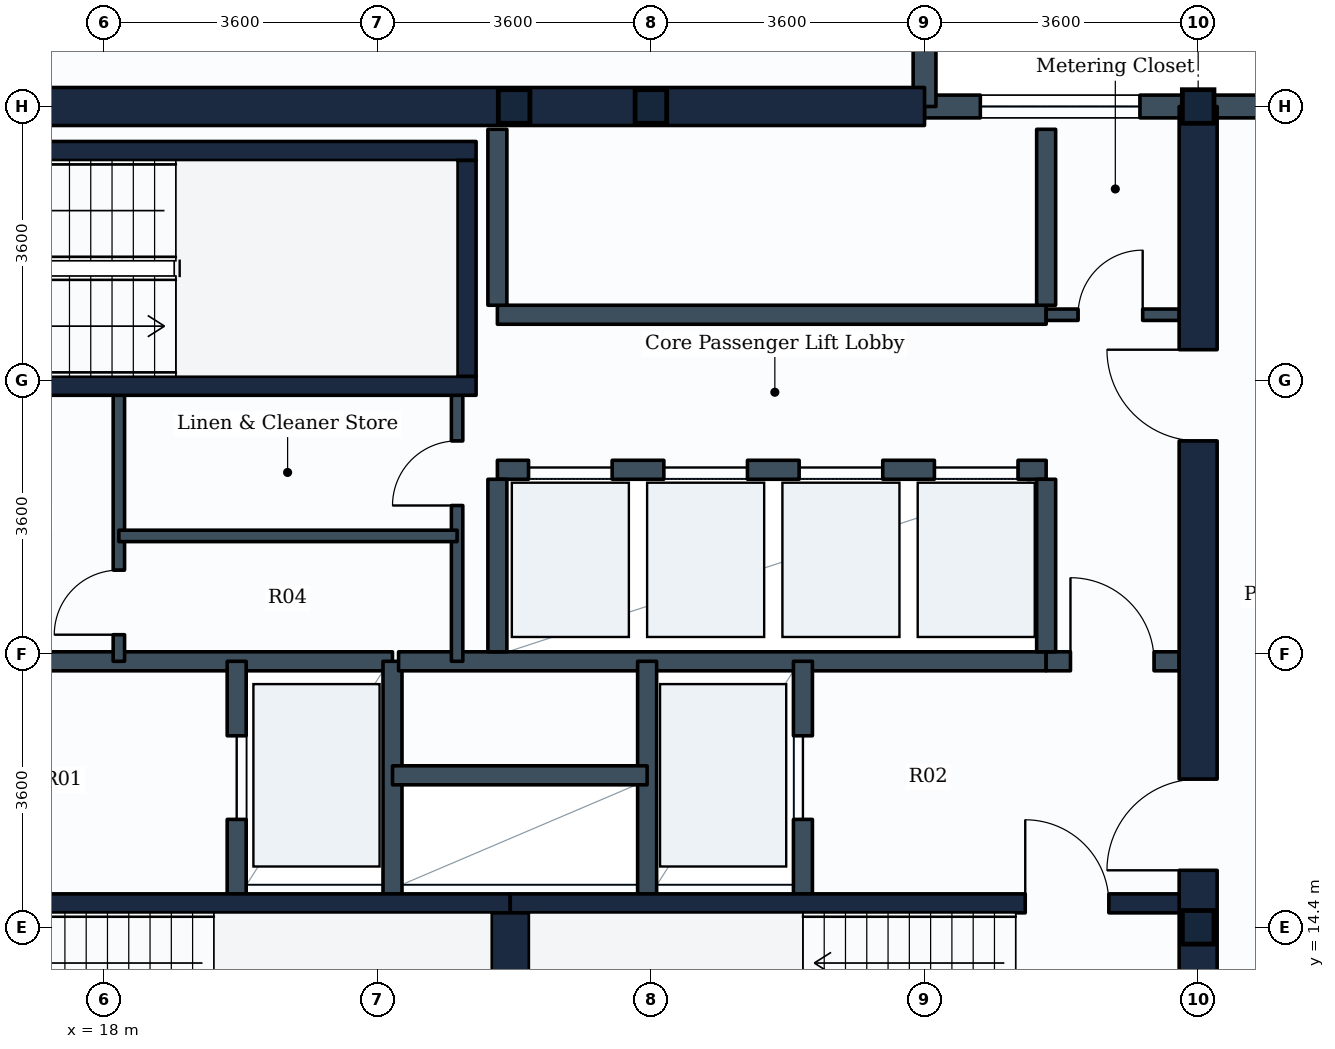
"""IFC4 building model, lengths in metres.
Left out: names, types, materials, properties, quantities, classifications, styles, units other than length and angle.
Written with IfcOpenShell. Run it as: python <this file> out.ifc"""

import sys

from ifc_helpers import new_model, si_unit, direction, frame, frame_2d, origin, origin_2d, place, context, subcontext, project, spatial, rectangle, i_section, extrude, element, fill, save


model = new_model("IFC4")
c1 = context("Model", 3, precision=1e-05, world=origin(), true_north=direction((0.0, 1.0)))
c2 = subcontext(c1, "Body", "Model", "MODEL_VIEW")
j1 = project(units=[si_unit("LENGTHUNIT", "METRE"), si_unit("PLANEANGLEUNIT", "RADIAN")], contexts=[c1])
p1 = place(None, origin())
s1 = spatial("IfcSite", under=j1, at=p1, CompositionType="ELEMENT")
p2 = place(p1, origin())
s2 = spatial("IfcBuilding", under=s1, at=p2, CompositionType="ELEMENT")
p3 = place(p2, frame((0.0, 0.0, 123.8)))
s3 = spatial("IfcBuildingStorey", under=s2, at=p3, CompositionType="ELEMENT", Elevation=123.8)
for number, where, z_axis, x_axis in (
    (1, (23.4, 25.2, 0.0), (0.0, 0.0, 1.0), (1.0, 0.0, 0.0)),
    (2, (25.2, 25.2, 0.0), (0.0, 0.0, 1.0), (1.0, 0.0, 0.0)),
    (3, (32.4, 14.4, 0.0), (0.0, 0.0, 1.0), (1.0, 0.0, 0.0)),
    (4, (32.4, 25.2, 0.0), (0.0, 0.0, 1.0), (1.0, 0.0, 0.0)),
):
    element("IfcColumn", number, at=place(p3, frame(where, z_axis=z_axis, x_axis=x_axis)), inside=s3, PredefinedType="COLUMN", context=c2, shape_type="SweptSolid", body=[
        extrude(i_section(OverallWidth=0.416, OverallDepth=0.442, WebThickness=0.025, FlangeThickness=0.041, FilletRadius=0.015, at=origin_2d()), origin(), (0.0, 0.0, 1.0), 3.8),
    ])
p4 = place(p3, frame((32.4, 25.2, 0.0), z_axis=(0.0, 0.0, 1.0), x_axis=(1.0, 0.0, 0.0)))
e5 = element("IfcWall", 5, at=p4, inside=s3, PredefinedType="STANDARD", context=c2, shape_type="SweptSolid", body=[
    extrude(rectangle(XDim=3.6, YDim=0.3, at=frame_2d((1.8, 0.0))), origin(), (0.0, 0.0, 1.0), 2.93),
])
p5 = place(p3, frame((28.8, 25.2, 0.0), z_axis=(0.0, 0.0, 1.0), x_axis=(1.0, 0.0, 0.0)))
e6 = element("IfcWall", 6, at=p5, inside=s3, PredefinedType="STANDARD", context=c2, shape_type="SweptSolid", body=[
    extrude(rectangle(XDim=3.6, YDim=0.3, at=frame_2d((1.8, 0.0))), origin(), (0.0, 0.0, 1.0), 3.465),
])
p6 = place(p5, frame((0.734, 0.0, 0.85)))
e7 = element("IfcOpeningElement", 7, at=p6, cuts=e6, PredefinedType="OPENING", context=c2, shape_type="SweptSolid", body=[
    extrude(rectangle(XDim=2.1, YDim=1.35, at=frame_2d((1.05, 0.675))), frame((0.0, 0.16, 0.0), z_axis=(0.0, -1.0, 0.0), x_axis=(1.0, 0.0, 0.0)), (0.0, 0.0, 1.0), 0.32),
])
p7 = place(p3, frame((28.8, 28.8, 0.0), z_axis=(0.0, 0.0, 1.0), x_axis=(0.0, -1.0, 0.0)))
e8 = element("IfcWall", 8, at=p7, inside=s3, PredefinedType="STANDARD", context=c2, shape_type="SweptSolid", body=[
    extrude(rectangle(XDim=3.6, YDim=0.3, at=frame_2d((1.8, 0.0))), origin(), (0.0, 0.0, 1.0), 3.15),
])
p8 = place(p3, frame((14.4, 25.2, 0.0), z_axis=(0.0, 0.0, 1.0), x_axis=(1.0, 0.0, 0.0)))
e9 = element("IfcWall", 9, at=p8, inside=s3, PredefinedType="SHEAR", context=c2, shape_type="SweptSolid", body=[
    extrude(rectangle(XDim=14.4, YDim=0.5, at=frame_2d((7.2, 0.0))), origin(), (0.0, 0.0, 1.0), 3.48),
])
p9 = place(p3, frame((32.4, 10.8, 0.0), z_axis=(0.0, 0.0, 1.0), x_axis=(0.0, 1.0, 0.0)))
e10 = element("IfcWall", 10, at=p9, inside=s3, PredefinedType="SHEAR", context=c2, shape_type="SweptSolid", body=[
    extrude(rectangle(XDim=14.4, YDim=0.5, at=frame_2d((7.2, 0.0))), origin(), (0.0, 0.0, 1.0), 3.48),
])
p10 = place(p9, frame((4.35, 0.0, 0.0)))
e11 = element("IfcOpeningElement", 11, at=p10, cuts=e10, PredefinedType="OPENING", context=c2, shape_type="SweptSolid", body=[
    extrude(rectangle(XDim=1.2, YDim=2.1, at=frame_2d((0.6, 1.05))), frame((0.0, 0.26, 0.0), z_axis=(0.0, -1.0, 0.0), x_axis=(1.0, 0.0, 0.0)), (0.0, 0.0, 1.0), 0.52),
])
p11 = place(p9, frame((10.0, 0.0, 0.0)))
e12 = element("IfcOpeningElement", 12, at=p11, cuts=e10, PredefinedType="OPENING", context=c2, shape_type="SweptSolid", body=[
    extrude(rectangle(XDim=1.2, YDim=2.1, at=frame_2d((0.6, 1.05))), frame((0.0, 0.26, 0.0), z_axis=(0.0, -1.0, 0.0), x_axis=(1.0, 0.0, 0.0)), (0.0, 0.0, 1.0), 0.52),
])
p12 = place(p3, frame((14.65, 14.715, 0.0), z_axis=(0.0, 0.0, 1.0), x_axis=(1.0, 0.0, 0.0)))
e13 = element("IfcWall", 13, at=p12, inside=s3, PredefinedType="SHEAR", context=c2, shape_type="SweptSolid", body=[
    extrude(rectangle(XDim=8.7, YDim=0.25, at=frame_2d((4.35, 0.0))), origin(), (0.0, 0.0, 1.0), 3.48),
])
p13 = place(p12, frame((0.705, 0.0, 0.0)))
e14 = element("IfcOpeningElement", 14, at=p13, cuts=e13, PredefinedType="OPENING", context=c2, shape_type="SweptSolid", body=[
    extrude(rectangle(XDim=1.1, YDim=2.1, at=frame_2d((0.55, 1.05))), frame((0.0, 0.135, 0.0), z_axis=(0.0, -1.0, 0.0), x_axis=(1.0, 0.0, 0.0)), (0.0, 0.0, 1.0), 0.27),
])
p14 = place(p3, frame((23.35, 14.715, 0.0), z_axis=(0.0, 0.0, 1.0), x_axis=(1.0, 0.0, 0.0)))
e15 = element("IfcWall", 15, at=p14, inside=s3, PredefinedType="SHEAR", context=c2, shape_type="SweptSolid", body=[
    extrude(rectangle(XDim=8.8, YDim=0.25, at=frame_2d((4.4, 0.0))), origin(), (0.0, 0.0, 1.0), 3.48),
])
p15 = place(p14, frame((6.775, 0.0, 0.0)))
e16 = element("IfcOpeningElement", 16, at=p15, cuts=e15, PredefinedType="OPENING", context=c2, shape_type="SweptSolid", body=[
    extrude(rectangle(XDim=1.1, YDim=2.1, at=frame_2d((0.55, 1.05))), frame((0.0, 0.135, 0.0), z_axis=(0.0, -1.0, 0.0), x_axis=(1.0, 0.0, 0.0)), (0.0, 0.0, 1.0), 0.27),
])
p16 = place(p3, frame((23.35, 11.75, 0.0), z_axis=(0.0, 0.0, 1.0), x_axis=(0.0, 1.0, 0.0)))
e17 = element("IfcWall", 17, at=p16, inside=s3, PredefinedType="SHEAR", context=c2, shape_type="SweptSolid", body=[
    extrude(rectangle(XDim=2.84, YDim=0.5, at=frame_2d((1.42, 0.0))), origin(), (0.0, 0.0, 1.0), 3.48),
])
for number, where, z_axis, x_axis in (
    (18, (14.65, 21.525, 0.0), (0.0, 0.0, 1.0), (1.0, 0.0, 0.0)),
    (19, (14.65, 24.615, 0.0), (0.0, 0.0, 1.0), (1.0, 0.0, 0.0)),
):
    element("IfcWall", number, at=place(p3, frame(where, z_axis=z_axis, x_axis=x_axis)), inside=s3, PredefinedType="SHEAR", context=c2, shape_type="SweptSolid", body=[
        extrude(rectangle(XDim=8.25, YDim=0.25, at=frame_2d((4.125, 0.0))), origin(), (0.0, 0.0, 1.0), 3.48),
    ])
p17 = place(p3, frame((22.775, 21.65, 0.0), z_axis=(0.0, 0.0, 1.0), x_axis=(0.0, 1.0, 0.0)))
e20 = element("IfcWall", 20, at=p17, inside=s3, PredefinedType="SHEAR", context=c2, shape_type="SweptSolid", body=[
    extrude(rectangle(XDim=2.84, YDim=0.25, at=frame_2d((1.42, 0.0))), origin(), (0.0, 0.0, 1.0), 3.48),
])
p18 = place(p3, frame((14.65, 17.9, 0.0), z_axis=(0.0, 0.0, 1.0), x_axis=(1.0, 0.0, 0.0)))
e21 = element("IfcWall", 21, at=p18, inside=s3, PredefinedType="PARTITIONING", context=c2, shape_type="SweptSolid", body=[
    extrude(rectangle(XDim=7.15, YDim=0.25, at=frame_2d((3.575, 0.0))), origin(), (0.0, 0.0, 1.0), 3.465),
])
p19 = place(p3, frame((19.75, 14.84, 0.0), z_axis=(0.0, 0.0, 1.0), x_axis=(0.0, 1.0, 0.0)))
e22 = element("IfcWall", 22, at=p19, inside=s3, PredefinedType="PARTITIONING", context=c2, shape_type="SweptSolid", body=[
    extrude(rectangle(XDim=3.06, YDim=0.25, at=frame_2d((1.53, 0.0))), origin(), (0.0, 0.0, 1.0), 3.465),
])
p20 = place(p19, frame((0.98, 0.0, 0.0)))
e23 = element("IfcOpeningElement", 23, at=p20, cuts=e22, PredefinedType="OPENING", context=c2, shape_type="SweptSolid", body=[
    extrude(rectangle(XDim=1.1, YDim=2.1, at=frame_2d((0.55, 1.05))), frame((0.0, 0.135, 0.0), z_axis=(0.0, -1.0, 0.0), x_axis=(1.0, 0.0, 0.0)), (0.0, 0.0, 1.0), 0.27),
])
p21 = place(p3, frame((21.8, 14.84, 0.0), z_axis=(0.0, 0.0, 1.0), x_axis=(0.0, 1.0, 0.0)))
e24 = element("IfcWall", 24, at=p21, inside=s3, PredefinedType="PARTITIONING", context=c2, shape_type="SweptSolid", body=[
    extrude(rectangle(XDim=3.06, YDim=0.25, at=frame_2d((1.53, 0.0))), origin(), (0.0, 0.0, 1.0), 3.465),
])
p22 = place(p3, frame((21.88, 17.9, 0.0), z_axis=(0.0, 0.0, 1.0), x_axis=(1.0, 0.0, 0.0)))
e25 = element("IfcWall", 25, at=p22, inside=s3, PredefinedType="PARTITIONING", context=c2, shape_type="SweptSolid", body=[
    extrude(rectangle(XDim=8.52, YDim=0.25, at=frame_2d((4.26, 0.0))), origin(), (0.0, 0.0, 1.0), 3.465),
])
p23 = place(p3, frame((30.4, 17.9, 0.0), z_axis=(0.0, 0.0, 1.0), x_axis=(1.0, 0.0, 0.0)))
e26 = element("IfcWall", 26, at=p23, inside=s3, PredefinedType="PARTITIONING", context=c2, shape_type="SweptSolid", body=[
    extrude(rectangle(XDim=1.75, YDim=0.25, at=frame_2d((0.875, 0.0))), origin(), (0.0, 0.0, 1.0), 3.465),
])
p24 = place(p23, frame((0.32, 0.0, 0.0)))
e27 = element("IfcOpeningElement", 27, at=p24, cuts=e26, PredefinedType="OPENING", context=c2, shape_type="SweptSolid", body=[
    extrude(rectangle(XDim=1.1, YDim=2.1, at=frame_2d((0.55, 1.05))), frame((0.0, 0.135, 0.0), z_axis=(0.0, -1.0, 0.0), x_axis=(1.0, 0.0, 0.0)), (0.0, 0.0, 1.0), 0.27),
])
p25 = place(p3, frame((25.15, 14.84, 0.0), z_axis=(0.0, 0.0, 1.0), x_axis=(0.0, 1.0, 0.0)))
e28 = element("IfcWall", 28, at=p25, inside=s3, PredefinedType="PARTITIONING", context=c2, shape_type="SweptSolid", body=[
    extrude(rectangle(XDim=3.06, YDim=0.25, at=frame_2d((1.53, 0.0))), origin(), (0.0, 0.0, 1.0), 3.465),
])
p26 = place(p3, frame((27.2, 14.84, 0.0), z_axis=(0.0, 0.0, 1.0), x_axis=(0.0, 1.0, 0.0)))
e29 = element("IfcWall", 29, at=p26, inside=s3, PredefinedType="PARTITIONING", context=c2, shape_type="SweptSolid", body=[
    extrude(rectangle(XDim=3.06, YDim=0.25, at=frame_2d((1.53, 0.0))), origin(), (0.0, 0.0, 1.0), 3.465),
])
p27 = place(p26, frame((0.98, 0.0, 0.0)))
e30 = element("IfcOpeningElement", 30, at=p27, cuts=e29, PredefinedType="OPENING", context=c2, shape_type="SweptSolid", body=[
    extrude(rectangle(XDim=1.1, YDim=2.1, at=frame_2d((0.55, 1.05))), frame((0.0, 0.135, 0.0), z_axis=(0.0, -1.0, 0.0), x_axis=(1.0, 0.0, 0.0)), (0.0, 0.0, 1.0), 0.27),
])
p28 = place(p3, frame((21.8, 16.4, 0.0), z_axis=(0.0, 0.0, 1.0), x_axis=(1.0, 0.0, 0.0)))
e31 = element("IfcWall", 31, at=p28, inside=s3, PredefinedType="PARTITIONING", context=c2, shape_type="SweptSolid", body=[
    extrude(rectangle(XDim=3.35, YDim=0.25, at=frame_2d((1.675, 0.0))), origin(), (0.0, 0.0, 1.0), 3.465),
])
p29 = place(p3, frame((23.18, 20.42, 0.0), z_axis=(0.0, 0.0, 1.0), x_axis=(1.0, 0.0, 0.0)))
e32 = element("IfcWall", 32, at=p29, inside=s3, PredefinedType="PARTITIONING", context=c2, shape_type="SweptSolid", body=[
    extrude(rectangle(XDim=7.22, YDim=0.25, at=frame_2d((3.61, 0.0))), origin(), (0.0, 0.0, 1.0), 3.465),
])
p30 = place(p29, frame((0.41, 0.0, 0.0)))
e33 = element("IfcOpeningElement", 33, at=p30, cuts=e32, PredefinedType="OPENING", context=c2, shape_type="SweptSolid", body=[
    extrude(rectangle(XDim=1.1, YDim=2.1, at=frame_2d((0.55, 1.05))), frame((0.0, 0.135, 0.0), z_axis=(0.0, -1.0, 0.0), x_axis=(1.0, 0.0, 0.0)), (0.0, 0.0, 1.0), 0.27),
])
p31 = place(p29, frame((2.19, 0.0, 0.0)))
e34 = element("IfcOpeningElement", 34, at=p31, cuts=e32, PredefinedType="OPENING", context=c2, shape_type="SweptSolid", body=[
    extrude(rectangle(XDim=1.1, YDim=2.1, at=frame_2d((0.55, 1.05))), frame((0.0, 0.135, 0.0), z_axis=(0.0, -1.0, 0.0), x_axis=(1.0, 0.0, 0.0)), (0.0, 0.0, 1.0), 0.27),
])
p32 = place(p29, frame((3.97, 0.0, 0.0)))
e35 = element("IfcOpeningElement", 35, at=p32, cuts=e32, PredefinedType="OPENING", context=c2, shape_type="SweptSolid", body=[
    extrude(rectangle(XDim=1.1, YDim=2.1, at=frame_2d((0.55, 1.05))), frame((0.0, 0.135, 0.0), z_axis=(0.0, -1.0, 0.0), x_axis=(1.0, 0.0, 0.0)), (0.0, 0.0, 1.0), 0.27),
])
p33 = place(p29, frame((5.75, 0.0, 0.0)))
e36 = element("IfcOpeningElement", 36, at=p33, cuts=e32, PredefinedType="OPENING", context=c2, shape_type="SweptSolid", body=[
    extrude(rectangle(XDim=1.1, YDim=2.1, at=frame_2d((0.55, 1.05))), frame((0.0, 0.135, 0.0), z_axis=(0.0, -1.0, 0.0), x_axis=(1.0, 0.0, 0.0)), (0.0, 0.0, 1.0), 0.27),
])
for number, where, z_axis, x_axis in (
    (37, (23.18, 18.025, 0.0), (0.0, 0.0, 1.0), (0.0, 1.0, 0.0)),
    (38, (30.4, 18.025, 0.0), (0.0, 0.0, 1.0), (0.0, 1.0, 0.0)),
):
    element("IfcWall", number, at=place(p3, frame(where, z_axis=z_axis, x_axis=x_axis)), inside=s3, PredefinedType="PARTITIONING", context=c2, shape_type="SweptSolid", body=[
        extrude(rectangle(XDim=2.27, YDim=0.25, at=frame_2d((1.135, 0.0))), origin(), (0.0, 0.0, 1.0), 3.465),
    ])
p34 = place(p3, frame((23.18, 22.46, 0.0), z_axis=(0.0, 0.0, 1.0), x_axis=(1.0, 0.0, 0.0)))
e39 = element("IfcWall", 39, at=p34, inside=s3, PredefinedType="PARTITIONING", context=c2, shape_type="SweptSolid", body=[
    extrude(rectangle(XDim=7.22, YDim=0.25, at=frame_2d((3.61, 0.0))), origin(), (0.0, 0.0, 1.0), 3.465),
])
for number, where, z_axis, x_axis in (
    (40, (23.18, 22.585, 0.0), (0.0, 0.0, 1.0), (0.0, 1.0, 0.0)),
    (41, (30.4, 22.585, 0.0), (0.0, 0.0, 1.0), (0.0, 1.0, 0.0)),
):
    element("IfcWall", number, at=place(p3, frame(where, z_axis=z_axis, x_axis=x_axis)), inside=s3, PredefinedType="PARTITIONING", context=c2, shape_type="SweptSolid", body=[
        extrude(rectangle(XDim=2.315, YDim=0.25, at=frame_2d((1.157, 0.0))), origin(), (0.0, 0.0, 1.0), 3.465),
    ])
p35 = place(p3, frame((22.65, 17.9, 0.0), z_axis=(0.0, 0.0, 1.0), x_axis=(0.0, 1.0, 0.0)))
e42 = element("IfcWall", 42, at=p35, inside=s3, PredefinedType="PARTITIONING", context=c2, shape_type="SweptSolid", body=[
    extrude(rectangle(XDim=3.625, YDim=0.15, at=frame_2d((1.812, 0.0))), origin(), (0.0, 0.0, 1.0), 3.465),
])
p36 = place(p35, frame((2.05, 0.0, 0.0)))
e43 = element("IfcOpeningElement", 43, at=p36, cuts=e42, PredefinedType="OPENING", context=c2, shape_type="SweptSolid", body=[
    extrude(rectangle(XDim=0.85, YDim=2.1, at=frame_2d((0.425, 1.05))), frame((0.0, 0.085, 0.0), z_axis=(0.0, -1.0, 0.0), x_axis=(1.0, 0.0, 0.0)), (0.0, 0.0, 1.0), 0.17),
])
p37 = place(p3, frame((18.2, 17.9, 0.0), z_axis=(0.0, 0.0, 1.0), x_axis=(0.0, 1.0, 0.0)))
e44 = element("IfcWall", 44, at=p37, inside=s3, PredefinedType="PARTITIONING", context=c2, shape_type="SweptSolid", body=[
    extrude(rectangle(XDim=3.625, YDim=0.15, at=frame_2d((1.812, 0.0))), origin(), (0.0, 0.0, 1.0), 3.465),
])
p38 = place(p37, frame((0.35, 0.0, 0.0)))
e45 = element("IfcOpeningElement", 45, at=p38, cuts=e44, PredefinedType="OPENING", context=c2, shape_type="SweptSolid", body=[
    extrude(rectangle(XDim=0.85, YDim=2.1, at=frame_2d((0.425, 1.05))), frame((0.0, 0.085, 0.0), z_axis=(0.0, -1.0, 0.0), x_axis=(1.0, 0.0, 0.0)), (0.0, 0.0, 1.0), 0.17),
])
p39 = place(p3, frame((18.2, 19.55, 0.0), z_axis=(0.0, 0.0, 1.0), x_axis=(1.0, 0.0, 0.0)))
e46 = element("IfcWall", 46, at=p39, inside=s3, PredefinedType="PARTITIONING", context=c2, shape_type="SweptSolid", body=[
    extrude(rectangle(XDim=4.45, YDim=0.15, at=frame_2d((2.225, 0.0))), origin(), (0.0, 0.0, 1.0), 3.465),
])
p40 = place(p3, frame((30.4, 22.46, 0.0), z_axis=(0.0, 0.0, 1.0), x_axis=(1.0, 0.0, 0.0)))
e47 = element("IfcWall", 47, at=p40, inside=s3, PredefinedType="PARTITIONING", context=c2, shape_type="SweptSolid", body=[
    extrude(rectangle(XDim=1.75, YDim=0.15, at=frame_2d((0.875, 0.0))), origin(), (0.0, 0.0, 1.0), 3.465),
])
p41 = place(p40, frame((0.42, 0.0, 0.0)))
e48 = element("IfcOpeningElement", 48, at=p41, cuts=e47, PredefinedType="OPENING", context=c2, shape_type="SweptSolid", body=[
    extrude(rectangle(XDim=0.85, YDim=2.1, at=frame_2d((0.425, 1.05))), frame((0.0, 0.085, 0.0), z_axis=(0.0, -1.0, 0.0), x_axis=(1.0, 0.0, 0.0)), (0.0, 0.0, 1.0), 0.17),
])
p42 = place(p6, origin())
e49 = element("IfcWindow", 49, at=p42, inside=s3, PartitioningType="SINGLE_PANEL", PredefinedType="WINDOW", context=c2, shape_type="SweptSolid", body=[
    extrude(rectangle(XDim=2.1, YDim=1.35, at=frame_2d((1.05, 0.675))), frame((0.0, 0.03, 0.0), z_axis=(0.0, -1.0, 0.0), x_axis=(1.0, 0.0, 0.0)), (0.0, 0.0, 1.0), 0.06),
])
fill(e7, e49)
p43 = place(p15, origin())
e50 = element("IfcDoor", 50, at=p43, inside=s3, OperationType="SINGLE_SWING_LEFT", PredefinedType="DOOR", context=c2, shape_type="SweptSolid", body=[
    extrude(rectangle(XDim=1.1, YDim=2.1, at=frame_2d((0.55, 1.05))), frame((0.0, 0.025, 0.0), z_axis=(0.0, -1.0, 0.0), x_axis=(1.0, 0.0, 0.0)), (0.0, 0.0, 1.0), 0.05),
])
fill(e16, e50)
p44 = place(p20, origin())
e51 = element("IfcDoor", 51, at=p44, inside=s3, OperationType="SLIDING_TO_LEFT", PredefinedType="DOOR", context=c2, shape_type="SweptSolid", body=[
    extrude(rectangle(XDim=1.1, YDim=2.1, at=frame_2d((0.55, 1.05))), frame((0.0, 0.025, 0.0), z_axis=(0.0, -1.0, 0.0), x_axis=(1.0, 0.0, 0.0)), (0.0, 0.0, 1.0), 0.05),
])
fill(e23, e51)
p45 = place(p27, origin())
e52 = element("IfcDoor", 52, at=p45, inside=s3, OperationType="SLIDING_TO_LEFT", PredefinedType="DOOR", context=c2, shape_type="SweptSolid", body=[
    extrude(rectangle(XDim=1.1, YDim=2.1, at=frame_2d((0.55, 1.05))), frame((0.0, 0.025, 0.0), z_axis=(0.0, -1.0, 0.0), x_axis=(1.0, 0.0, 0.0)), (0.0, 0.0, 1.0), 0.05),
])
fill(e30, e52)
p46 = place(p10, origin())
e53 = element("IfcDoor", 53, at=p46, inside=s3, OperationType="SINGLE_SWING_LEFT", PredefinedType="DOOR", context=c2, shape_type="SweptSolid", body=[
    extrude(rectangle(XDim=1.2, YDim=2.1, at=frame_2d((0.6, 1.05))), frame((0.0, 0.025, 0.0), z_axis=(0.0, -1.0, 0.0), x_axis=(1.0, 0.0, 0.0)), (0.0, 0.0, 1.0), 0.05),
])
fill(e11, e53)
p47 = place(p24, origin())
e54 = element("IfcDoor", 54, at=p47, inside=s3, OperationType="SINGLE_SWING_LEFT", PredefinedType="DOOR", context=c2, shape_type="SweptSolid", body=[
    extrude(rectangle(XDim=1.1, YDim=2.1, at=frame_2d((0.55, 1.05))), frame((0.0, 0.025, 0.0), z_axis=(0.0, -1.0, 0.0), x_axis=(1.0, 0.0, 0.0)), (0.0, 0.0, 1.0), 0.05),
])
fill(e27, e54)
p48 = place(p30, origin())
e55 = element("IfcDoor", 55, at=p48, inside=s3, OperationType="SLIDING_TO_LEFT", PredefinedType="DOOR", context=c2, shape_type="SweptSolid", body=[
    extrude(rectangle(XDim=1.1, YDim=2.1, at=frame_2d((0.55, 1.05))), frame((0.0, 0.025, 0.0), z_axis=(0.0, -1.0, 0.0), x_axis=(1.0, 0.0, 0.0)), (0.0, 0.0, 1.0), 0.05),
])
fill(e33, e55)
p49 = place(p31, origin())
e56 = element("IfcDoor", 56, at=p49, inside=s3, OperationType="SLIDING_TO_LEFT", PredefinedType="DOOR", context=c2, shape_type="SweptSolid", body=[
    extrude(rectangle(XDim=1.1, YDim=2.1, at=frame_2d((0.55, 1.05))), frame((0.0, 0.025, 0.0), z_axis=(0.0, -1.0, 0.0), x_axis=(1.0, 0.0, 0.0)), (0.0, 0.0, 1.0), 0.05),
])
fill(e34, e56)
p50 = place(p32, origin())
e57 = element("IfcDoor", 57, at=p50, inside=s3, OperationType="SLIDING_TO_LEFT", PredefinedType="DOOR", context=c2, shape_type="SweptSolid", body=[
    extrude(rectangle(XDim=1.1, YDim=2.1, at=frame_2d((0.55, 1.05))), frame((0.0, 0.025, 0.0), z_axis=(0.0, -1.0, 0.0), x_axis=(1.0, 0.0, 0.0)), (0.0, 0.0, 1.0), 0.05),
])
fill(e35, e57)
p51 = place(p33, origin())
e58 = element("IfcDoor", 58, at=p51, inside=s3, OperationType="SLIDING_TO_LEFT", PredefinedType="DOOR", context=c2, shape_type="SweptSolid", body=[
    extrude(rectangle(XDim=1.1, YDim=2.1, at=frame_2d((0.55, 1.05))), frame((0.0, 0.025, 0.0), z_axis=(0.0, -1.0, 0.0), x_axis=(1.0, 0.0, 0.0)), (0.0, 0.0, 1.0), 0.05),
])
fill(e36, e58)
p52 = place(p11, origin())
e59 = element("IfcDoor", 59, at=p52, inside=s3, OperationType="SINGLE_SWING_RIGHT", PredefinedType="DOOR", context=c2, shape_type="SweptSolid", body=[
    extrude(rectangle(XDim=1.2, YDim=2.1, at=frame_2d((0.6, 1.05))), frame((0.0, 0.025, 0.0), z_axis=(0.0, -1.0, 0.0), x_axis=(1.0, 0.0, 0.0)), (0.0, 0.0, 1.0), 0.05),
])
fill(e12, e59)
p53 = place(p38, origin())
e60 = element("IfcDoor", 60, at=p53, inside=s3, OperationType="SINGLE_SWING_LEFT", PredefinedType="DOOR", context=c2, shape_type="SweptSolid", body=[
    extrude(rectangle(XDim=0.85, YDim=2.1, at=frame_2d((0.425, 1.05))), frame((0.0, 0.025, 0.0), z_axis=(0.0, -1.0, 0.0), x_axis=(1.0, 0.0, 0.0)), (0.0, 0.0, 1.0), 0.05),
])
fill(e45, e60)
p54 = place(p36, origin())
e61 = element("IfcDoor", 61, at=p54, inside=s3, OperationType="SINGLE_SWING_LEFT", PredefinedType="DOOR", context=c2, shape_type="SweptSolid", body=[
    extrude(rectangle(XDim=0.85, YDim=2.1, at=frame_2d((0.425, 1.05))), frame((0.0, 0.025, 0.0), z_axis=(0.0, -1.0, 0.0), x_axis=(1.0, 0.0, 0.0)), (0.0, 0.0, 1.0), 0.05),
])
fill(e43, e61)
p55 = place(p41, origin())
e62 = element("IfcDoor", 62, at=p55, inside=s3, OperationType="SINGLE_SWING_RIGHT", PredefinedType="DOOR", context=c2, shape_type="SweptSolid", body=[
    extrude(rectangle(XDim=0.85, YDim=2.1, at=frame_2d((0.425, 1.05))), frame((0.0, 0.025, 0.0), z_axis=(0.0, -1.0, 0.0), x_axis=(1.0, 0.0, 0.0)), (0.0, 0.0, 1.0), 0.05),
])
fill(e48, e62)
save(model, sys.argv[1])
